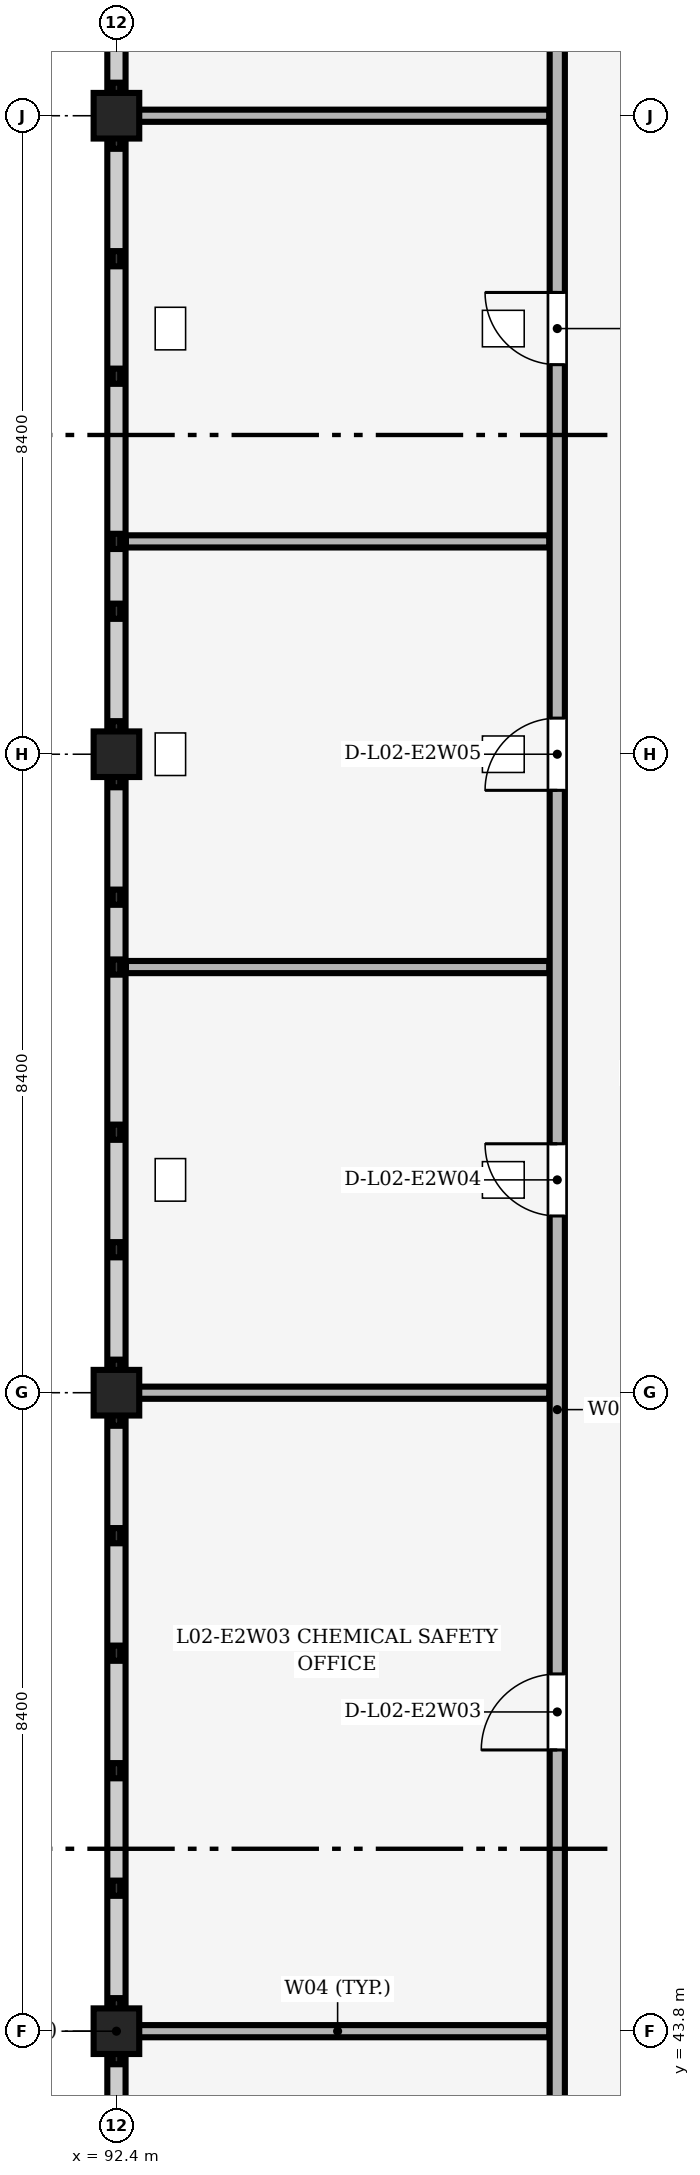
"""IFC4 building model, lengths in metres.
Left out: names, types, materials, properties, quantities, classifications, styles, units other than length and angle.
Written with IfcOpenShell. Run it as: python <this file> out.ifc"""

import sys

from ifc_helpers import new_model, si_unit, direction, frame, frame_2d, origin, origin_2d, place, context, subcontext, project, spatial, rectangle, extrude, element, fill, save


model = new_model("IFC4")
c1 = context("Model", 3, precision=1e-05, world=origin(), true_north=direction((0.0, 1.0)))
c2 = subcontext(c1, "Body", "Model", "MODEL_VIEW")
j1 = project(units=[si_unit("LENGTHUNIT", "METRE"), si_unit("PLANEANGLEUNIT", "RADIAN")], contexts=[c1])
p1 = place(None, origin())
s1 = spatial("IfcSite", under=j1, at=p1, CompositionType="ELEMENT")
p2 = place(p1, origin())
s2 = spatial("IfcBuilding", under=s1, at=p2, CompositionType="ELEMENT")
p3 = place(p2, frame((0.0, 0.0, 9.0)))
s3 = spatial("IfcBuildingStorey", under=s2, at=p3, CompositionType="ELEMENT", Elevation=9.0)
for number, where, z_axis, x_axis in (
    (1, (92.4, 43.8, 0.0), (0.0, 0.0, 1.0), (1.0, 0.0, 0.0)),
    (2, (92.4, 52.2, 0.0), (0.0, 0.0, 1.0), (1.0, 0.0, 0.0)),
    (3, (92.4, 60.6, 0.0), (0.0, 0.0, 1.0), (1.0, 0.0, 0.0)),
    (4, (92.4, 69.0, 0.0), (0.0, 0.0, 1.0), (1.0, 0.0, 0.0)),
):
    element("IfcColumn", number, at=place(p3, frame(where, z_axis=z_axis, x_axis=x_axis)), inside=s3, PredefinedType="COLUMN", context=c2, shape_type="SweptSolid", body=[
        extrude(rectangle(XDim=0.6, YDim=0.6, at=origin_2d()), origin(), (0.0, 0.0, 1.0), 4.2),
    ])
p4 = place(p3, frame((92.4, 35.675, 0.0), z_axis=(0.0, 0.0, 1.0), x_axis=(0.0, 1.0, 0.0)))
e5 = element("IfcWall", 5, at=p4, inside=s3, PredefinedType="SOLIDWALL", context=c2, shape_type="SweptSolid", body=[
    extrude(rectangle(XDim=7.85, YDim=0.24, at=frame_2d((3.925, 0.0))), origin(), (0.0, 0.0, 1.0), 1.15),
])
p5 = place(p3, frame((92.4, 44.075, 0.0), z_axis=(0.0, 0.0, 1.0), x_axis=(0.0, 1.0, 0.0)))
e6 = element("IfcWall", 6, at=p5, inside=s3, PredefinedType="SOLIDWALL", context=c2, shape_type="SweptSolid", body=[
    extrude(rectangle(XDim=7.85, YDim=0.24, at=frame_2d((3.925, 0.0))), origin(), (0.0, 0.0, 1.0), 1.15),
])
p6 = place(p3, frame((92.4, 52.475, 0.0), z_axis=(0.0, 0.0, 1.0), x_axis=(0.0, 1.0, 0.0)))
e7 = element("IfcWall", 7, at=p6, inside=s3, PredefinedType="SOLIDWALL", context=c2, shape_type="SweptSolid", body=[
    extrude(rectangle(XDim=7.85, YDim=0.24, at=frame_2d((3.925, 0.0))), origin(), (0.0, 0.0, 1.0), 1.15),
])
for number, where, z_axis, x_axis in (
    (8, (92.4, 60.875, 0.0), (0.0, 0.0, 1.0), (0.0, 1.0, 0.0)),
    (9, (92.4, 69.275, 0.0), (0.0, 0.0, 1.0), (0.0, 1.0, 0.0)),
):
    element("IfcWall", number, at=place(p3, frame(where, z_axis=z_axis, x_axis=x_axis)), inside=s3, PredefinedType="SOLIDWALL", context=c2, shape_type="SweptSolid", body=[
        extrude(rectangle(XDim=7.85, YDim=0.24, at=frame_2d((3.925, 0.0))), origin(), (0.0, 0.0, 1.0), 1.15),
    ])
p7 = place(p3, frame((92.525, 43.8, 0.0), z_axis=(0.0, 0.0, 1.0), x_axis=(1.0, 0.0, 0.0)))
e10 = element("IfcWall", 10, at=p7, inside=s3, PredefinedType="PARTITIONING", context=c2, shape_type="SweptSolid", body=[
    extrude(rectangle(XDim=5.57, YDim=0.16, at=frame_2d((2.785, 0.0))), origin(), (0.0, 0.0, 1.0), 3.19),
])
p8 = place(p3, frame((92.525, 52.2, 0.0), z_axis=(0.0, 0.0, 1.0), x_axis=(1.0, 0.0, 0.0)))
e11 = element("IfcWall", 11, at=p8, inside=s3, PredefinedType="PARTITIONING", context=c2, shape_type="SweptSolid", body=[
    extrude(rectangle(XDim=5.57, YDim=0.16, at=frame_2d((2.785, 0.0))), origin(), (0.0, 0.0, 1.0), 2.99),
])
for number, where, z_axis, x_axis in (
    (12, (92.525, 57.8, 0.0), (0.0, 0.0, 1.0), (1.0, 0.0, 0.0)),
    (13, (92.525, 63.4, 0.0), (0.0, 0.0, 1.0), (1.0, 0.0, 0.0)),
):
    element("IfcWall", number, at=place(p3, frame(where, z_axis=z_axis, x_axis=x_axis)), inside=s3, PredefinedType="PARTITIONING", context=c2, shape_type="SweptSolid", body=[
        extrude(rectangle(XDim=5.57, YDim=0.16, at=frame_2d((2.785, 0.0))), origin(), (0.0, 0.0, 1.0), 3.46),
    ])
p9 = place(p3, frame((92.525, 69.0, 0.0), z_axis=(0.0, 0.0, 1.0), x_axis=(1.0, 0.0, 0.0)))
e14 = element("IfcWall", 14, at=p9, inside=s3, PredefinedType="PARTITIONING", context=c2, shape_type="SweptSolid", body=[
    extrude(rectangle(XDim=5.57, YDim=0.16, at=frame_2d((2.785, 0.0))), origin(), (0.0, 0.0, 1.0), 3.24),
])
p10 = place(p3, frame((98.2, 18.165, 0.0), z_axis=(0.0, 0.0, 1.0), x_axis=(0.0, 1.0, 0.0)))
e15 = element("IfcWall", 15, at=p10, inside=s3, PredefinedType="PARTITIONING", context=c2, shape_type="SweptSolid", body=[
    extrude(rectangle(XDim=67.625, YDim=0.2, at=frame_2d((33.812, 0.0))), origin(), (0.0, 0.0, 1.0), 3.9),
])
p11 = place(p10, frame((5.835, 0.0, 0.0)))
e16 = element("IfcOpeningElement", 16, at=p11, cuts=e15, PredefinedType="OPENING", context=c2, shape_type="SweptSolid", body=[
    extrude(rectangle(XDim=1.0, YDim=2.15, at=frame_2d((0.5, 1.075))), frame((0.0, 0.11, 0.0), z_axis=(0.0, -1.0, 0.0), x_axis=(1.0, 0.0, 0.0)), (0.0, 0.0, 1.0), 0.22),
])
p12 = place(p10, frame((18.735, 0.0, 0.0)))
e17 = element("IfcOpeningElement", 17, at=p12, cuts=e15, PredefinedType="OPENING", context=c2, shape_type="SweptSolid", body=[
    extrude(rectangle(XDim=1.0, YDim=2.15, at=frame_2d((0.5, 1.075))), frame((0.0, 0.11, 0.0), z_axis=(0.0, -1.0, 0.0), x_axis=(1.0, 0.0, 0.0)), (0.0, 0.0, 1.0), 0.22),
])
p13 = place(p10, frame((29.335, 0.0, 0.0)))
e18 = element("IfcOpeningElement", 18, at=p13, cuts=e15, PredefinedType="OPENING", context=c2, shape_type="SweptSolid", body=[
    extrude(rectangle(XDim=1.0, YDim=2.15, at=frame_2d((0.5, 1.075))), frame((0.0, 0.11, 0.0), z_axis=(0.0, -1.0, 0.0), x_axis=(1.0, 0.0, 0.0)), (0.0, 0.0, 1.0), 0.22),
])
p14 = place(p10, frame((36.36, 0.0, 0.0)))
e19 = element("IfcOpeningElement", 19, at=p14, cuts=e15, PredefinedType="OPENING", context=c2, shape_type="SweptSolid", body=[
    extrude(rectangle(XDim=0.95, YDim=2.2, at=frame_2d((0.475, 1.1))), frame((0.0, 0.11, 0.0), z_axis=(0.0, -1.0, 0.0), x_axis=(1.0, 0.0, 0.0)), (0.0, 0.0, 1.0), 0.22),
])
p15 = place(p10, frame((41.96, 0.0, 0.0)))
e20 = element("IfcOpeningElement", 20, at=p15, cuts=e15, PredefinedType="OPENING", context=c2, shape_type="SweptSolid", body=[
    extrude(rectangle(XDim=0.95, YDim=2.2, at=frame_2d((0.475, 1.1))), frame((0.0, 0.11, 0.0), z_axis=(0.0, -1.0, 0.0), x_axis=(1.0, 0.0, 0.0)), (0.0, 0.0, 1.0), 0.22),
])
p16 = place(p10, frame((47.56, 0.0, 0.0)))
e21 = element("IfcOpeningElement", 21, at=p16, cuts=e15, PredefinedType="OPENING", context=c2, shape_type="SweptSolid", body=[
    extrude(rectangle(XDim=0.95, YDim=2.1, at=frame_2d((0.475, 1.05))), frame((0.0, 0.11, 0.0), z_axis=(0.0, -1.0, 0.0), x_axis=(1.0, 0.0, 0.0)), (0.0, 0.0, 1.0), 0.22),
])
p17 = place(p10, frame((54.535, 0.0, 0.0)))
e22 = element("IfcOpeningElement", 22, at=p17, cuts=e15, PredefinedType="OPENING", context=c2, shape_type="SweptSolid", body=[
    extrude(rectangle(XDim=1.0, YDim=2.15, at=frame_2d((0.5, 1.075))), frame((0.0, 0.11, 0.0), z_axis=(0.0, -1.0, 0.0), x_axis=(1.0, 0.0, 0.0)), (0.0, 0.0, 1.0), 0.22),
])
p18 = place(p10, frame((62.935, 0.0, 0.0)))
e23 = element("IfcOpeningElement", 23, at=p18, cuts=e15, PredefinedType="OPENING", context=c2, shape_type="SweptSolid", body=[
    extrude(rectangle(XDim=1.0, YDim=2.15, at=frame_2d((0.5, 1.075))), frame((0.0, 0.11, 0.0), z_axis=(0.0, -1.0, 0.0), x_axis=(1.0, 0.0, 0.0)), (0.0, 0.0, 1.0), 0.22),
])
p19 = place(p13, origin())
e24 = element("IfcDoor", 24, at=p19, inside=s3, OperationType="SINGLE_SWING_LEFT", PredefinedType="DOOR", context=c2, shape_type="SweptSolid", body=[
    extrude(rectangle(XDim=1.0, YDim=2.15, at=frame_2d((0.5, 1.075))), frame((0.0, 0.025, 0.0), z_axis=(0.0, -1.0, 0.0), x_axis=(1.0, 0.0, 0.0)), (0.0, 0.0, 1.0), 0.05),
])
fill(e18, e24)
p20 = place(p14, origin())
e25 = element("IfcDoor", 25, at=p20, inside=s3, OperationType="SINGLE_SWING_RIGHT", PredefinedType="DOOR", context=c2, shape_type="SweptSolid", body=[
    extrude(rectangle(XDim=0.95, YDim=2.2, at=frame_2d((0.475, 1.1))), frame((0.0, 0.025, 0.0), z_axis=(0.0, -1.0, 0.0), x_axis=(1.0, 0.0, 0.0)), (0.0, 0.0, 1.0), 0.05),
])
fill(e19, e25)
p21 = place(p15, origin())
e26 = element("IfcDoor", 26, at=p21, inside=s3, OperationType="SINGLE_SWING_LEFT", PredefinedType="DOOR", context=c2, shape_type="SweptSolid", body=[
    extrude(rectangle(XDim=0.95, YDim=2.2, at=frame_2d((0.475, 1.1))), frame((0.0, 0.025, 0.0), z_axis=(0.0, -1.0, 0.0), x_axis=(1.0, 0.0, 0.0)), (0.0, 0.0, 1.0), 0.05),
])
fill(e20, e26)
p22 = place(p16, origin())
e27 = element("IfcDoor", 27, at=p22, inside=s3, OperationType="SINGLE_SWING_RIGHT", PredefinedType="DOOR", context=c2, shape_type="SweptSolid", body=[
    extrude(rectangle(XDim=0.95, YDim=2.1, at=frame_2d((0.475, 1.05))), frame((0.0, 0.025, 0.0), z_axis=(0.0, -1.0, 0.0), x_axis=(1.0, 0.0, 0.0)), (0.0, 0.0, 1.0), 0.05),
])
fill(e21, e27)
save(model, sys.argv[1])
